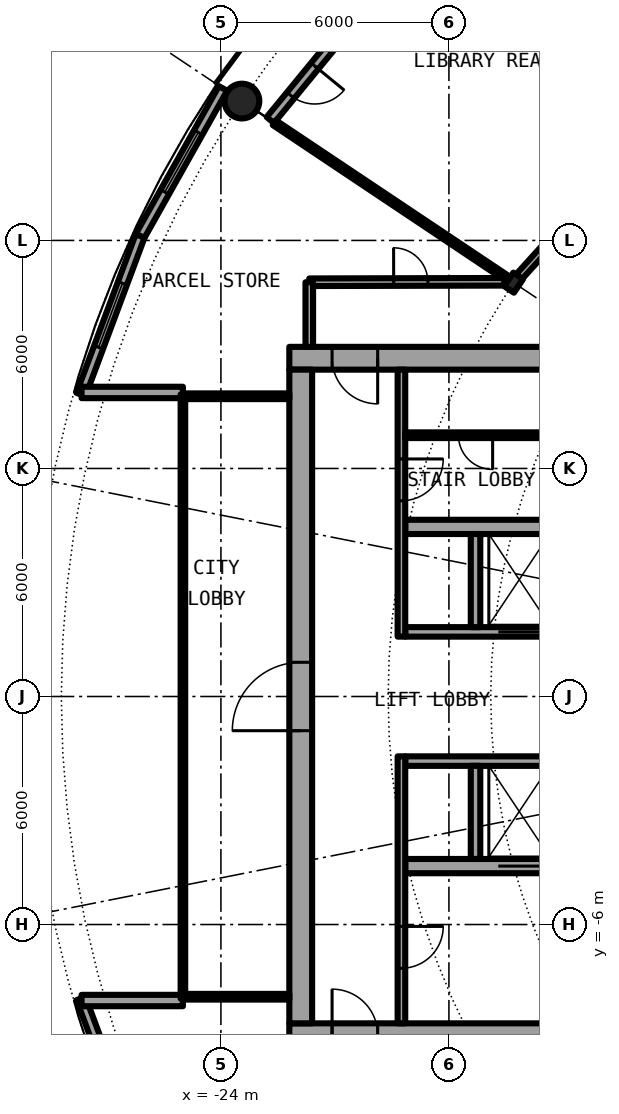
"""IFC4 building model, lengths in metres.
Left out: names, types, materials, properties, quantities, classifications, styles, units other than length and angle.
Written with IfcOpenShell. Run it as: python <this file> out.ifc"""

import sys

from ifc_helpers import new_model, si_unit, direction, frame, frame_2d, origin, origin_2d, place, context, subcontext, project, spatial, rectangle, hollow_circle, i_section, extrude, element, fill, save


model = new_model("IFC4")
c1 = context("Model", 3, precision=1e-05, world=origin(), true_north=direction((0.0, 1.0)))
c2 = subcontext(c1, "Body", "Model", "MODEL_VIEW")
j1 = project(units=[si_unit("LENGTHUNIT", "METRE"), si_unit("PLANEANGLEUNIT", "RADIAN")], contexts=[c1])
p1 = place(None, origin())
s1 = spatial("IfcSite", under=j1, at=p1, CompositionType="ELEMENT")
p2 = place(p1, origin())
s2 = spatial("IfcBuilding", under=s1, at=p2, CompositionType="ELEMENT")
p3 = place(p2, frame((0.0, 0.0, 107.45)))
s3 = spatial("IfcBuildingStorey", under=s2, at=p3, CompositionType="ELEMENT", Elevation=107.45)
p4 = place(p3, frame((-23.448, 15.667, 0.0), z_axis=(0.0, 0.0, 1.0), x_axis=(1.0, 0.0, 0.0)))
e1 = element("IfcColumn", 1, at=p4, inside=s3, PredefinedType="COLUMN", context=c2, shape_type="SweptSolid", body=[
    extrude(hollow_circle(Radius=0.457, WallThickness=0.04, at=origin_2d()), origin(), (0.0, 0.0, 1.0), 4.2),
])
p5 = place(p3, frame((-16.297, 10.889, 0.0), z_axis=(0.0, 0.0, 1.0), x_axis=(-0.831469612303, 0.55557023302, 0.0)))
e2 = element("IfcColumn", 2, at=p5, inside=s3, PredefinedType="COLUMN", context=c2, shape_type="SweptSolid", body=[
    extrude(i_section(OverallWidth=0.307, OverallDepth=0.432, WebThickness=0.021, FlangeThickness=0.04, FilletRadius=0.027, at=origin_2d()), origin(), (0.0, 0.0, 1.0), 4.2),
])
p6 = place(p3, frame((-19.304, 19.304, 0.0), z_axis=(0.0, 0.0, 1.0), x_axis=(-0.634382322723, -0.773019449054, 0.0)))
e3 = element("IfcWall", 3, at=p6, inside=s3, PredefinedType="SOLIDWALL", context=c2, shape_type="SweptSolid", body=[
    extrude(rectangle(XDim=5.352, YDim=0.25, at=frame_2d((2.676, 0.0))), origin(), (0.0, 0.0, 1.0), 3.85),
])
p7 = place(p6, frame((0.841, 0.0, 0.0)))
e4 = element("IfcOpeningElement", 4, at=p7, cuts=e3, PredefinedType="OPENING", context=c2, shape_type="SweptSolid", body=[
    extrude(rectangle(XDim=1.0, YDim=2.2, at=frame_2d((0.5, 1.1))), frame((0.0, 0.135, 0.0), z_axis=(0.0, -1.0, 0.0), x_axis=(1.0, 0.0, 0.0)), (0.0, 0.0, 1.0), 0.27),
])
p8 = place(p6, frame((3.51, 0.0, 0.0)))
e5 = element("IfcOpeningElement", 5, at=p8, cuts=e3, PredefinedType="OPENING", context=c2, shape_type="SweptSolid", body=[
    extrude(rectangle(XDim=1.0, YDim=2.2, at=frame_2d((0.5, 1.1))), frame((0.0, 0.135, 0.0), z_axis=(0.0, -1.0, 0.0), x_axis=(1.0, 0.0, 0.0)), (0.0, 0.0, 1.0), 0.27),
])
p9 = place(p3, frame((-27.682, -7.945, 0.0), z_axis=(0.0, 0.0, 1.0), x_axis=(0.349247811493, -0.937030397675, 0.0)))
e6 = element("IfcWall", 6, at=p9, inside=s3, PredefinedType="SOLIDWALL", context=c2, shape_type="SweptSolid", body=[
    extrude(rectangle(XDim=4.452, YDim=0.25, at=frame_2d((2.226, 0.0))), origin(), (0.0, 0.0, 1.0), 3.85),
])
p10 = place(p9, frame((1.327, 0.0, 0.3)))
e7 = element("IfcOpeningElement", 7, at=p10, cuts=e6, PredefinedType="OPENING", context=c2, shape_type="SweptSolid", body=[
    extrude(rectangle(XDim=1.8, YDim=2.1, at=frame_2d((0.9, 1.05))), frame((0.0, 0.135, 0.0), z_axis=(0.0, -1.0, 0.0), x_axis=(1.0, 0.0, 0.0)), (0.0, 0.0, 1.0), 0.27),
])
p11 = place(p3, frame((-23.946, 16.0, 0.0), z_axis=(0.0, 0.0, 1.0), x_axis=(-0.489696356642, -0.871893042919, 0.0)))
e8 = element("IfcWall", 8, at=p11, inside=s3, PredefinedType="SOLIDWALL", context=c2, shape_type="SweptSolid", body=[
    extrude(rectangle(XDim=4.454, YDim=0.25, at=frame_2d((2.227, 0.0))), origin(), (0.0, 0.0, 1.0), 3.85),
])
p12 = place(p11, frame((1.327, 0.0, 0.3)))
e9 = element("IfcOpeningElement", 9, at=p12, cuts=e8, PredefinedType="OPENING", context=c2, shape_type="SweptSolid", body=[
    extrude(rectangle(XDim=1.8, YDim=2.1, at=frame_2d((0.9, 1.05))), frame((0.0, 0.135, 0.0), z_axis=(0.0, -1.0, 0.0), x_axis=(1.0, 0.0, 0.0)), (0.0, 0.0, 1.0), 0.27),
])
p13 = place(p3, frame((-26.127, 12.117, 0.0), z_axis=(0.0, 0.0, 1.0), x_axis=(-0.349247811493, -0.937030397675, 0.0)))
e10 = element("IfcWall", 10, at=p13, inside=s3, PredefinedType="SOLIDWALL", context=c2, shape_type="SweptSolid", body=[
    extrude(rectangle(XDim=4.452, YDim=0.25, at=frame_2d((2.226, 0.0))), origin(), (0.0, 0.0, 1.0), 3.85),
])
p14 = place(p13, frame((1.327, 0.0, 0.3)))
e11 = element("IfcOpeningElement", 11, at=p14, cuts=e10, PredefinedType="OPENING", context=c2, shape_type="SweptSolid", body=[
    extrude(rectangle(XDim=1.8, YDim=2.1, at=frame_2d((0.9, 1.05))), frame((0.0, 0.135, 0.0), z_axis=(0.0, -1.0, 0.0), x_axis=(1.0, 0.0, 0.0)), (0.0, 0.0, 1.0), 0.27),
])
for number, where, z_axis, x_axis in (
    (12, (-25.0, 8.0, 0.0), (0.0, 0.0, 1.0), (-1.0, 0.0, 0.0)),
    (13, (-25.0, -8.0, 0.0), (0.0, 0.0, 1.0), (-1.0, 0.0, 0.0)),
):
    element("IfcWall", number, at=place(p3, frame(where, z_axis=z_axis, x_axis=x_axis)), inside=s3, PredefinedType="SOLIDWALL", context=c2, shape_type="SweptSolid", body=[
        extrude(rectangle(XDim=2.667, YDim=0.3, at=frame_2d((1.333, 0.0))), origin(), (0.0, 0.0, 1.0), 3.85),
    ])
p15 = place(p3, frame((-22.2, -8.9, 0.0), z_axis=(0.0, 0.0, 1.0), x_axis=(1.0, 0.0, 0.0)))
e14 = element("IfcWall", 14, at=p15, inside=s3, PredefinedType="SHEAR", context=c2, shape_type="SweptSolid", body=[
    extrude(rectangle(XDim=13.8, YDim=0.6, at=frame_2d((6.9, 0.0))), origin(), (0.0, 0.0, 1.0), 4.2),
])
p16 = place(p15, frame((1.125, 0.0, 0.0)))
e15 = element("IfcOpeningElement", 15, at=p16, cuts=e14, PredefinedType="OPENING", context=c2, shape_type="SweptSolid", body=[
    extrude(rectangle(XDim=1.2, YDim=2.3, at=frame_2d((0.6, 1.15))), frame((0.0, 0.31, 0.0), z_axis=(0.0, -1.0, 0.0), x_axis=(1.0, 0.0, 0.0)), (0.0, 0.0, 1.0), 0.62),
])
p17 = place(p3, frame((-8.4, 8.9, 0.0), z_axis=(0.0, 0.0, 1.0), x_axis=(-1.0, 0.0, 0.0)))
e16 = element("IfcWall", 16, at=p17, inside=s3, PredefinedType="SHEAR", context=c2, shape_type="SweptSolid", body=[
    extrude(rectangle(XDim=13.8, YDim=0.6, at=frame_2d((6.9, 0.0))), origin(), (0.0, 0.0, 1.0), 4.2),
])
p18 = place(p17, frame((11.475, 0.0, 0.0)))
e17 = element("IfcOpeningElement", 17, at=p18, cuts=e16, PredefinedType="OPENING", context=c2, shape_type="SweptSolid", body=[
    extrude(rectangle(XDim=1.2, YDim=2.3, at=frame_2d((0.6, 1.15))), frame((0.0, 0.31, 0.0), z_axis=(0.0, -1.0, 0.0), x_axis=(1.0, 0.0, 0.0)), (0.0, 0.0, 1.0), 0.62),
])
p19 = place(p3, frame((-21.9, -8.6, 0.0), z_axis=(0.0, 0.0, 1.0), x_axis=(0.0, 1.0, 0.0)))
e18 = element("IfcWall", 18, at=p19, inside=s3, PredefinedType="SHEAR", context=c2, shape_type="SweptSolid", body=[
    extrude(rectangle(XDim=17.2, YDim=0.6, at=frame_2d((8.6, 0.0))), origin(), (0.0, 0.0, 1.0), 4.2),
])
p20 = place(p19, frame((7.7, 0.0, 0.0)))
e19 = element("IfcOpeningElement", 19, at=p20, cuts=e18, PredefinedType="OPENING", context=c2, shape_type="SweptSolid", body=[
    extrude(rectangle(XDim=1.8, YDim=2.3, at=frame_2d((0.9, 1.15))), frame((0.0, 0.31, 0.0), z_axis=(0.0, -1.0, 0.0), x_axis=(1.0, 0.0, 0.0)), (0.0, 0.0, 1.0), 0.62),
])
p21 = place(p3, frame((-9.0, -1.7, 0.0), z_axis=(0.0, 0.0, 1.0), x_axis=(-1.0, 0.0, 0.0)))
e20 = element("IfcWall", 20, at=p21, inside=s3, PredefinedType="SHEAR", context=c2, shape_type="SweptSolid", body=[
    extrude(rectangle(XDim=10.15, YDim=0.25, at=frame_2d((5.075, 0.0))), origin(), (0.0, 0.0, 1.0), 4.2),
])
p22 = place(p21, frame((0.387, 0.0, 0.0)))
e21 = element("IfcOpeningElement", 21, at=p22, cuts=e20, PredefinedType="OPENING", context=c2, shape_type="SweptSolid", body=[
    extrude(rectangle(XDim=1.1, YDim=2.3, at=frame_2d((0.55, 1.15))), frame((0.0, 0.135, 0.0), z_axis=(0.0, -1.0, 0.0), x_axis=(1.0, 0.0, 0.0)), (0.0, 0.0, 1.0), 0.27),
])
p23 = place(p21, frame((2.45, 0.0, 0.0)))
e22 = element("IfcOpeningElement", 22, at=p23, cuts=e20, PredefinedType="OPENING", context=c2, shape_type="SweptSolid", body=[
    extrude(rectangle(XDim=1.1, YDim=2.3, at=frame_2d((0.55, 1.15))), frame((0.0, 0.135, 0.0), z_axis=(0.0, -1.0, 0.0), x_axis=(1.0, 0.0, 0.0)), (0.0, 0.0, 1.0), 0.27),
])
p24 = place(p21, frame((4.45, 0.0, 0.0)))
e23 = element("IfcOpeningElement", 23, at=p24, cuts=e20, PredefinedType="OPENING", context=c2, shape_type="SweptSolid", body=[
    extrude(rectangle(XDim=1.1, YDim=2.3, at=frame_2d((0.55, 1.15))), frame((0.0, 0.135, 0.0), z_axis=(0.0, -1.0, 0.0), x_axis=(1.0, 0.0, 0.0)), (0.0, 0.0, 1.0), 0.27),
])
p25 = place(p3, frame((-9.0, -4.462, 0.0), z_axis=(0.0, 0.0, 1.0), x_axis=(-1.0, 0.0, 0.0)))
e24 = element("IfcWall", 24, at=p25, inside=s3, PredefinedType="SHEAR", context=c2, shape_type="SweptSolid", body=[
    extrude(rectangle(XDim=10.15, YDim=0.375, at=frame_2d((5.075, 0.0))), origin(), (0.0, 0.0, 1.0), 4.2),
])
p26 = place(p25, frame((6.6, 0.0, 0.0)))
e25 = element("IfcOpeningElement", 25, at=p26, cuts=e24, PredefinedType="OPENING", context=c2, shape_type="SweptSolid", body=[
    extrude(rectangle(XDim=1.1, YDim=2.3, at=frame_2d((0.55, 1.15))), frame((0.0, 0.198, 0.0), z_axis=(0.0, -1.0, 0.0), x_axis=(1.0, 0.0, 0.0)), (0.0, 0.0, 1.0), 0.395),
])
p27 = place(p3, frame((-17.3, -1.825, 0.0), z_axis=(0.0, 0.0, 1.0), x_axis=(0.0, -1.0, 0.0)))
e26 = element("IfcWall", 26, at=p27, inside=s3, PredefinedType="SOLIDWALL", context=c2, shape_type="SweptSolid", body=[
    extrude(rectangle(XDim=2.45, YDim=0.25, at=frame_2d((1.225, 0.0))), origin(), (0.0, 0.0, 1.0), 3.85),
])
p28 = place(p3, frame((-19.25, -1.575, 0.0), z_axis=(0.0, 0.0, 1.0), x_axis=(0.0, -1.0, 0.0)))
e27 = element("IfcWall", 27, at=p28, inside=s3, PredefinedType="SOLIDWALL", context=c2, shape_type="SweptSolid", body=[
    extrude(rectangle(XDim=7.025, YDim=0.2, at=frame_2d((3.513, 0.0))), origin(), (0.0, 0.0, 1.0), 3.85),
])
p29 = place(p28, frame((4.475, 0.0, 0.0)))
e28 = element("IfcOpeningElement", 28, at=p29, cuts=e27, PredefinedType="OPENING", context=c2, shape_type="SweptSolid", body=[
    extrude(rectangle(XDim=1.1, YDim=2.3, at=frame_2d((0.55, 1.15))), frame((0.0, 0.11, 0.0), z_axis=(0.0, -1.0, 0.0), x_axis=(1.0, 0.0, 0.0)), (0.0, 0.0, 1.0), 0.22),
])
p30 = place(p3, frame((-19.15, 1.7, 0.0), z_axis=(0.0, 0.0, 1.0), x_axis=(1.0, 0.0, 0.0)))
e29 = element("IfcWall", 29, at=p30, inside=s3, PredefinedType="SHEAR", context=c2, shape_type="SweptSolid", body=[
    extrude(rectangle(XDim=10.15, YDim=0.25, at=frame_2d((5.075, 0.0))), origin(), (0.0, 0.0, 1.0), 4.2),
])
p31 = place(p30, frame((2.45, 0.0, 0.0)))
e30 = element("IfcOpeningElement", 30, at=p31, cuts=e29, PredefinedType="OPENING", context=c2, shape_type="SweptSolid", body=[
    extrude(rectangle(XDim=1.1, YDim=2.3, at=frame_2d((0.55, 1.15))), frame((0.0, 0.135, 0.0), z_axis=(0.0, -1.0, 0.0), x_axis=(1.0, 0.0, 0.0)), (0.0, 0.0, 1.0), 0.27),
])
p32 = place(p30, frame((8.087, 0.0, 0.0)))
e31 = element("IfcOpeningElement", 31, at=p32, cuts=e29, PredefinedType="OPENING", context=c2, shape_type="SweptSolid", body=[
    extrude(rectangle(XDim=0.9, YDim=2.3, at=frame_2d((0.45, 1.15))), frame((0.0, 0.135, 0.0), z_axis=(0.0, -1.0, 0.0), x_axis=(1.0, 0.0, 0.0)), (0.0, 0.0, 1.0), 0.27),
])
p33 = place(p30, frame((5.075, 0.0, 0.0)))
e32 = element("IfcOpeningElement", 32, at=p33, cuts=e29, PredefinedType="OPENING", context=c2, shape_type="SweptSolid", body=[
    extrude(rectangle(XDim=0.9, YDim=2.3, at=frame_2d((0.45, 1.15))), frame((0.0, 0.135, 0.0), z_axis=(0.0, -1.0, 0.0), x_axis=(1.0, 0.0, 0.0)), (0.0, 0.0, 1.0), 0.27),
])
p34 = place(p3, frame((-9.0, 4.462, 0.0), z_axis=(0.0, 0.0, 1.0), x_axis=(-1.0, 0.0, 0.0)))
e33 = element("IfcWall", 33, at=p34, inside=s3, PredefinedType="SHEAR", context=c2, shape_type="SweptSolid", body=[
    extrude(rectangle(XDim=10.15, YDim=0.375, at=frame_2d((5.075, 0.0))), origin(), (0.0, 0.0, 1.0), 4.2),
])
p35 = place(p3, frame((-17.3, 1.825, 0.0), z_axis=(0.0, 0.0, 1.0), x_axis=(0.0, 1.0, 0.0)))
e34 = element("IfcWall", 34, at=p35, inside=s3, PredefinedType="SOLIDWALL", context=c2, shape_type="SweptSolid", body=[
    extrude(rectangle(XDim=2.45, YDim=0.25, at=frame_2d((1.225, 0.0))), origin(), (0.0, 0.0, 1.0), 3.85),
])
p36 = place(p3, frame((-19.25, 8.6, 0.0), z_axis=(0.0, 0.0, 1.0), x_axis=(0.0, -1.0, 0.0)))
e35 = element("IfcWall", 35, at=p36, inside=s3, PredefinedType="SOLIDWALL", context=c2, shape_type="SweptSolid", body=[
    extrude(rectangle(XDim=7.025, YDim=0.2, at=frame_2d((3.513, 0.0))), origin(), (0.0, 0.0, 1.0), 3.85),
])
p37 = place(p36, frame((2.35, 0.0, 0.0)))
e36 = element("IfcOpeningElement", 36, at=p37, cuts=e35, PredefinedType="OPENING", context=c2, shape_type="SweptSolid", body=[
    extrude(rectangle(XDim=1.1, YDim=2.3, at=frame_2d((0.55, 1.15))), frame((0.0, 0.11, 0.0), z_axis=(0.0, -1.0, 0.0), x_axis=(1.0, 0.0, 0.0)), (0.0, 0.0, 1.0), 0.22),
])
p38 = place(p3, frame((-15.45, 6.875, 0.0), z_axis=(0.0, 0.0, 1.0), x_axis=(-1.0, 0.0, 0.0)))
e37 = element("IfcWall", 37, at=p38, inside=s3, PredefinedType="PARTITIONING", context=c2, shape_type="SweptSolid", body=[
    extrude(rectangle(XDim=3.7, YDim=0.15, at=frame_2d((1.85, 0.0))), origin(), (0.0, 0.0, 1.0), 3.85),
])
p39 = place(p38, frame((1.4, 0.0, 0.0)))
e38 = element("IfcOpeningElement", 38, at=p39, cuts=e37, PredefinedType="OPENING", context=c2, shape_type="SweptSolid", body=[
    extrude(rectangle(XDim=0.9, YDim=2.3, at=frame_2d((0.45, 1.15))), frame((0.0, 0.085, 0.0), z_axis=(0.0, -1.0, 0.0), x_axis=(1.0, 0.0, 0.0)), (0.0, 0.0, 1.0), 0.17),
])
for number, where, z_axis, x_axis in (
    (39, (-22.2, 7.9, 0.0), (0.0, 0.0, 1.0), (-1.0, 0.0, 0.0)),
    (40, (-22.2, -7.9, 0.0), (0.0, 0.0, 1.0), (-1.0, 0.0, 0.0)),
):
    element("IfcWall", number, at=place(p3, frame(where, z_axis=z_axis, x_axis=x_axis)), inside=s3, PredefinedType="PARTITIONING", context=c2, shape_type="SweptSolid", body=[
        extrude(rectangle(XDim=2.74, YDim=0.15, at=frame_2d((1.37, 0.0))), origin(), (0.0, 0.0, 1.0), 3.85),
    ])
p40 = place(p3, frame((-25.0, 7.95, 0.0), z_axis=(0.0, 0.0, 1.0), x_axis=(0.0, -1.0, 0.0)))
e41 = element("IfcWall", 41, at=p40, inside=s3, PredefinedType="PARTITIONING", context=c2, shape_type="SweptSolid", body=[
    extrude(rectangle(XDim=15.9, YDim=0.12, at=frame_2d((7.95, 0.0))), origin(), (0.0, 0.0, 1.0), 3.85),
])
p41 = place(p40, frame((0.95, 0.0, 0.1)))
e42 = element("IfcOpeningElement", 42, at=p41, cuts=e41, PredefinedType="OPENING", context=c2, shape_type="SweptSolid", body=[
    extrude(rectangle(XDim=14.0, YDim=3.5, at=frame_2d((7.0, 1.75))), frame((0.0, 0.07, 0.0), z_axis=(0.0, -1.0, 0.0), x_axis=(1.0, 0.0, 0.0)), (0.0, 0.0, 1.0), 0.14),
])
p42 = place(p3, frame((-22.595, 15.098, 0.0), z_axis=(0.0, 0.0, 1.0), x_axis=(0.831406593008, -0.555664536482, 0.0)))
e43 = element("IfcWall", 43, at=p42, inside=s3, PredefinedType="PARTITIONING", context=c2, shape_type="SweptSolid", body=[
    extrude(rectangle(XDim=7.358, YDim=0.15, at=frame_2d((3.679, 0.0))), origin(), (0.0, 0.0, 1.0), 3.85),
])
p43 = place(p3, frame((-21.675, 10.9, 0.0), z_axis=(0.0, 0.0, 1.0), x_axis=(0.999997173357, 0.002377662213, 0.0)))
e44 = element("IfcWall", 44, at=p43, inside=s3, PredefinedType="PARTITIONING", context=c2, shape_type="SweptSolid", body=[
    extrude(rectangle(XDim=5.134, YDim=0.2, at=frame_2d((2.567, 0.0))), origin(), (0.0, 0.0, 1.0), 3.85),
])
p44 = place(p43, frame((2.221, 0.0, 0.0)))
e45 = element("IfcOpeningElement", 45, at=p44, cuts=e44, PredefinedType="OPENING", context=c2, shape_type="SweptSolid", body=[
    extrude(rectangle(XDim=0.9, YDim=2.3, at=frame_2d((0.45, 1.15))), frame((0.0, 0.11, 0.0), z_axis=(0.0, -1.0, 0.0), x_axis=(1.0, 0.0, 0.0)), (0.0, 0.0, 1.0), 0.22),
])
p45 = place(p3, frame((-16.192, 11.004, 0.0), z_axis=(0.0, 0.0, 1.0), x_axis=(0.671481997275, 0.741020868354, 0.0)))
e46 = element("IfcWall", 46, at=p45, inside=s3, PredefinedType="PARTITIONING", context=c2, shape_type="SweptSolid", body=[
    extrude(rectangle(XDim=5.596, YDim=0.2, at=frame_2d((2.798, 0.0))), origin(), (0.0, 0.0, 1.0), 3.54),
])
p46 = place(p3, frame((-21.675, 9.2, 0.0), z_axis=(0.0, 0.0, 1.0), x_axis=(0.0, 1.0, 0.0)))
e47 = element("IfcWall", 47, at=p46, inside=s3, PredefinedType="PARTITIONING", context=c2, shape_type="SweptSolid", body=[
    extrude(rectangle(XDim=1.7, YDim=0.2, at=frame_2d((0.85, 0.0))), origin(), (0.0, 0.0, 1.0), 3.85),
])
p47 = place(p8, origin())
e48 = element("IfcDoor", 48, at=p47, inside=s3, OperationType="SINGLE_SWING_LEFT", PredefinedType="DOOR", context=c2, shape_type="SweptSolid", body=[
    extrude(rectangle(XDim=1.0, YDim=2.2, at=frame_2d((0.5, 1.1))), frame((0.0, 0.025, 0.0), z_axis=(0.0, -1.0, 0.0), x_axis=(1.0, 0.0, 0.0)), (0.0, 0.0, 1.0), 0.05),
])
fill(e5, e48)
p48 = place(p12, origin())
e49 = element("IfcWindow", 49, at=p48, inside=s3, PartitioningType="SINGLE_PANEL", PredefinedType="WINDOW", context=c2, shape_type="SweptSolid", body=[
    extrude(rectangle(XDim=1.8, YDim=2.1, at=frame_2d((0.9, 1.05))), frame((0.0, 0.03, 0.0), z_axis=(0.0, -1.0, 0.0), x_axis=(1.0, 0.0, 0.0)), (0.0, 0.0, 1.0), 0.06),
])
fill(e9, e49)
p49 = place(p14, origin())
e50 = element("IfcWindow", 50, at=p49, inside=s3, PartitioningType="SINGLE_PANEL", PredefinedType="WINDOW", context=c2, shape_type="SweptSolid", body=[
    extrude(rectangle(XDim=1.8, YDim=2.1, at=frame_2d((0.9, 1.05))), frame((0.0, 0.03, 0.0), z_axis=(0.0, -1.0, 0.0), x_axis=(1.0, 0.0, 0.0)), (0.0, 0.0, 1.0), 0.06),
])
fill(e11, e50)
p50 = place(p26, origin())
e51 = element("IfcDoor", 51, at=p50, inside=s3, OperationType="DOUBLE_DOOR_SLIDING", PredefinedType="DOOR", context=c2, shape_type="SweptSolid", body=[
    extrude(rectangle(XDim=1.1, YDim=2.3, at=frame_2d((0.55, 1.15))), frame((0.0, 0.025, 0.0), z_axis=(0.0, -1.0, 0.0), x_axis=(1.0, 0.0, 0.0)), (0.0, 0.0, 1.0), 0.05),
])
fill(e25, e51)
p51 = place(p31, origin())
e52 = element("IfcDoor", 52, at=p51, inside=s3, OperationType="DOUBLE_DOOR_SLIDING", PredefinedType="DOOR", context=c2, shape_type="SweptSolid", body=[
    extrude(rectangle(XDim=1.1, YDim=2.3, at=frame_2d((0.55, 1.15))), frame((0.0, 0.025, 0.0), z_axis=(0.0, -1.0, 0.0), x_axis=(1.0, 0.0, 0.0)), (0.0, 0.0, 1.0), 0.05),
])
fill(e30, e52)
p52 = place(p39, origin())
e53 = element("IfcDoor", 53, at=p52, inside=s3, OperationType="SINGLE_SWING_LEFT", PredefinedType="DOOR", context=c2, shape_type="SweptSolid", body=[
    extrude(rectangle(XDim=0.9, YDim=2.3, at=frame_2d((0.45, 1.15))), frame((0.0, 0.025, 0.0), z_axis=(0.0, -1.0, 0.0), x_axis=(1.0, 0.0, 0.0)), (0.0, 0.0, 1.0), 0.05),
])
fill(e38, e53)
p53 = place(p29, origin())
e54 = element("IfcDoor", 54, at=p53, inside=s3, OperationType="SINGLE_SWING_LEFT", PredefinedType="DOOR", context=c2, shape_type="SweptSolid", body=[
    extrude(rectangle(XDim=1.1, YDim=2.3, at=frame_2d((0.55, 1.15))), frame((0.0, 0.025, 0.0), z_axis=(0.0, -1.0, 0.0), x_axis=(1.0, 0.0, 0.0)), (0.0, 0.0, 1.0), 0.05),
])
fill(e28, e54)
p54 = place(p37, origin())
e55 = element("IfcDoor", 55, at=p54, inside=s3, OperationType="SINGLE_SWING_RIGHT", PredefinedType="DOOR", context=c2, shape_type="SweptSolid", body=[
    extrude(rectangle(XDim=1.1, YDim=2.3, at=frame_2d((0.55, 1.15))), frame((0.0, 0.025, 0.0), z_axis=(0.0, -1.0, 0.0), x_axis=(1.0, 0.0, 0.0)), (0.0, 0.0, 1.0), 0.05),
])
fill(e36, e55)
p55 = place(p16, origin())
e56 = element("IfcDoor", 56, at=p55, inside=s3, OperationType="SINGLE_SWING_RIGHT", PredefinedType="DOOR", context=c2, shape_type="SweptSolid", body=[
    extrude(rectangle(XDim=1.2, YDim=2.3, at=frame_2d((0.6, 1.15))), frame((0.0, 0.025, 0.0), z_axis=(0.0, -1.0, 0.0), x_axis=(1.0, 0.0, 0.0)), (0.0, 0.0, 1.0), 0.05),
])
fill(e15, e56)
p56 = place(p18, origin())
e57 = element("IfcDoor", 57, at=p56, inside=s3, OperationType="SINGLE_SWING_LEFT", PredefinedType="DOOR", context=c2, shape_type="SweptSolid", body=[
    extrude(rectangle(XDim=1.2, YDim=2.3, at=frame_2d((0.6, 1.15))), frame((0.0, 0.025, 0.0), z_axis=(0.0, -1.0, 0.0), x_axis=(1.0, 0.0, 0.0)), (0.0, 0.0, 1.0), 0.05),
])
fill(e17, e57)
p57 = place(p20, origin())
e58 = element("IfcDoor", 58, at=p57, inside=s3, OperationType="SINGLE_SWING_LEFT", PredefinedType="DOOR", context=c2, shape_type="SweptSolid", body=[
    extrude(rectangle(XDim=1.8, YDim=2.3, at=frame_2d((0.9, 1.15))), frame((0.0, 0.025, 0.0), z_axis=(0.0, -1.0, 0.0), x_axis=(1.0, 0.0, 0.0)), (0.0, 0.0, 1.0), 0.05),
])
fill(e19, e58)
p58 = place(p41, origin())
e59 = element("IfcWindow", 59, at=p58, inside=s3, PartitioningType="SINGLE_PANEL", PredefinedType="WINDOW", context=c2, shape_type="SweptSolid", body=[
    extrude(rectangle(XDim=14.0, YDim=3.5, at=frame_2d((7.0, 1.75))), frame((0.0, 0.03, 0.0), z_axis=(0.0, -1.0, 0.0), x_axis=(1.0, 0.0, 0.0)), (0.0, 0.0, 1.0), 0.06),
])
fill(e42, e59)
p59 = place(p44, origin())
e60 = element("IfcDoor", 60, at=p59, inside=s3, OperationType="SINGLE_SWING_RIGHT", PredefinedType="DOOR", context=c2, shape_type="SweptSolid", body=[
    extrude(rectangle(XDim=0.9, YDim=2.3, at=frame_2d((0.45, 1.15))), frame((0.0, 0.025, 0.0), z_axis=(0.0, -1.0, 0.0), x_axis=(1.0, 0.0, 0.0)), (0.0, 0.0, 1.0), 0.05),
])
fill(e45, e60)
save(model, sys.argv[1])
